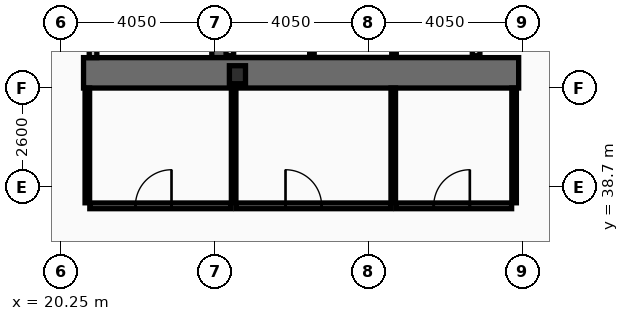
"""IFC4 building model, lengths in metres.
Left out: names, types, materials, properties, quantities, classifications, styles, units other than length and angle.
Written with IfcOpenShell. Run it as: python <this file> out.ifc"""

import sys

from ifc_helpers import new_model, si_unit, direction, frame, frame_2d, origin, origin_2d, place, context, subcontext, project, spatial, rectangle, i_section, extrude, element, fill, save


model = new_model("IFC4")
c1 = context("Model", 3, precision=1e-05, world=origin(), true_north=direction((0.0, 1.0)))
c2 = subcontext(c1, "Body", "Model", "MODEL_VIEW")
j1 = project(units=[si_unit("LENGTHUNIT", "METRE"), si_unit("PLANEANGLEUNIT", "RADIAN")], contexts=[c1])
p1 = place(None, origin())
s1 = spatial("IfcSite", under=j1, at=p1, CompositionType="ELEMENT")
p2 = place(p1, origin())
s2 = spatial("IfcBuilding", under=s1, at=p2, CompositionType="ELEMENT")
p3 = place(p2, frame((0.0, 0.0, 10.4)))
s3 = spatial("IfcBuildingStorey", under=s2, at=p3, CompositionType="ELEMENT", Elevation=10.4)
p4 = place(p3, frame((24.45, 42.1, 0.0), z_axis=(0.0, 0.0, 1.0), x_axis=(0.0, 1.0, 0.0)))
e1 = element("IfcWall", 1, at=p4, inside=s3, PredefinedType="SHEAR", context=c2, shape_type="SweptSolid", body=[
    extrude(rectangle(XDim=10.8, YDim=0.45, at=frame_2d((5.4, 0.0))), origin(), (0.0, 0.0, 1.0), 4.8),
])
p5 = place(p3, frame((32.3, 41.7, 0.0), z_axis=(0.0, 0.0, 1.0), x_axis=(-1.0, 0.0, 0.0)))
e2 = element("IfcWall", 2, at=p5, inside=s3, PredefinedType="SHEAR", context=c2, shape_type="SweptSolid", body=[
    extrude(rectangle(XDim=11.45, YDim=0.8, at=frame_2d((5.725, 0.0))), origin(), (0.0, 0.0, 1.0), 4.8),
])
p6 = place(p3, frame((24.9, 41.65, 0.0), z_axis=(0.0, 0.0, 1.0), x_axis=(1.0, 0.0, 0.0)))
e3 = element("IfcColumn", 3, at=p6, inside=s3, PredefinedType="COLUMN", context=c2, shape_type="SweptSolid", body=[
    extrude(i_section(OverallWidth=0.424, OverallDepth=0.474, WebThickness=0.048, FlangeThickness=0.077, at=origin_2d()), origin(), (0.0, 0.0, 1.0), 5.0),
])
p7 = place(p3, frame((21.1, 42.1, 0.0), z_axis=(0.0, 0.0, 1.0), x_axis=(0.0, 1.0, 0.0)))
e4 = element("IfcWall", 4, at=p7, inside=s3, PredefinedType="PARTITIONING", context=c2, shape_type="SweptSolid", body=[
    extrude(rectangle(XDim=2.395, YDim=0.2, at=frame_2d((1.198, 0.0))), origin(), (0.0, 0.0, 1.0), 4.8),
])
p8 = place(p7, frame((0.38, 0.0, 0.0)))
e5 = element("IfcOpeningElement", 5, at=p8, cuts=e4, PredefinedType="OPENING", context=c2, shape_type="SweptSolid", body=[
    extrude(rectangle(XDim=1.05, YDim=2.15, at=frame_2d((0.525, 1.075))), frame((0.0, 0.11, 0.0), z_axis=(0.0, -1.0, 0.0), x_axis=(1.0, 0.0, 0.0)), (0.0, 0.0, 1.0), 0.22),
])
for number, where, z_axis, x_axis in (
    (6, (24.7, 42.15, 0.0), (0.0, 0.0, 1.0), (0.0, 1.0, 0.0)),
    (7, (31.18, 42.15, 0.0), (0.0, 0.0, 1.0), (0.0, 1.0, 0.0)),
):
    element("IfcWall", number, at=place(p3, frame(where, z_axis=z_axis, x_axis=x_axis)), inside=s3, PredefinedType="PARTITIONING", context=c2, shape_type="SweptSolid", body=[
        extrude(rectangle(XDim=2.095, YDim=0.2, at=frame_2d((1.048, 0.0))), origin(), (0.0, 0.0, 1.0), 4.8),
    ])
for number, where, z_axis, x_axis in (
    (8, (26.86, 42.15, 0.0), (0.0, 0.0, 1.0), (0.0, 1.0, 0.0)),
    (9, (29.02, 42.15, 0.0), (0.0, 0.0, 1.0), (0.0, 1.0, 0.0)),
):
    element("IfcWall", number, at=place(p3, frame(where, z_axis=z_axis, x_axis=x_axis)), inside=s3, PredefinedType="PARTITIONING", context=c2, shape_type="SweptSolid", body=[
        extrude(rectangle(XDim=2.095, YDim=0.12, at=frame_2d((1.048, 0.0))), origin(), (0.0, 0.0, 1.0), 4.8),
    ])
p9 = place(p3, frame((21.015, 38.2, 0.0), z_axis=(0.0, 0.0, 1.0), x_axis=(1.0, 0.0, 0.0)))
e10 = element("IfcWall", 10, at=p9, inside=s3, PredefinedType="PARTITIONING", context=c2, shape_type="SweptSolid", body=[
    extrude(rectangle(XDim=3.72, YDim=0.15, at=frame_2d((1.86, 0.0))), origin(), (0.0, 0.0, 1.0), 3.89),
])
p10 = place(p9, frame((1.2, 0.0, 0.0)))
e11 = element("IfcOpeningElement", 11, at=p10, cuts=e10, PredefinedType="OPENING", context=c2, shape_type="SweptSolid", body=[
    extrude(rectangle(XDim=0.95, YDim=2.05, at=frame_2d((0.475, 1.025))), frame((0.0, 0.085, 0.0), z_axis=(0.0, -1.0, 0.0), x_axis=(1.0, 0.0, 0.0)), (0.0, 0.0, 1.0), 0.17),
])
p11 = place(p3, frame((24.865, 38.2, 0.0), z_axis=(0.0, 0.0, 1.0), x_axis=(1.0, 0.0, 0.0)))
e12 = element("IfcWall", 12, at=p11, inside=s3, PredefinedType="PARTITIONING", context=c2, shape_type="SweptSolid", body=[
    extrude(rectangle(XDim=4.07, YDim=0.15, at=frame_2d((2.035, 0.0))), origin(), (0.0, 0.0, 1.0), 3.89),
])
p12 = place(p11, frame((1.3, 0.0, 0.0)))
e13 = element("IfcOpeningElement", 13, at=p12, cuts=e12, PredefinedType="OPENING", context=c2, shape_type="SweptSolid", body=[
    extrude(rectangle(XDim=0.95, YDim=2.05, at=frame_2d((0.475, 1.025))), frame((0.0, 0.085, 0.0), z_axis=(0.0, -1.0, 0.0), x_axis=(1.0, 0.0, 0.0)), (0.0, 0.0, 1.0), 0.17),
])
p13 = place(p3, frame((29.065, 38.2, 0.0), z_axis=(0.0, 0.0, 1.0), x_axis=(1.0, 0.0, 0.0)))
e14 = element("IfcWall", 14, at=p13, inside=s3, PredefinedType="PARTITIONING", context=c2, shape_type="SweptSolid", body=[
    extrude(rectangle(XDim=3.05, YDim=0.15, at=frame_2d((1.525, 0.0))), origin(), (0.0, 0.0, 1.0), 3.89),
])
p14 = place(p13, frame((1.0, 0.0, 0.0)))
e15 = element("IfcOpeningElement", 15, at=p14, cuts=e14, PredefinedType="OPENING", context=c2, shape_type="SweptSolid", body=[
    extrude(rectangle(XDim=0.95, YDim=2.05, at=frame_2d((0.475, 1.025))), frame((0.0, 0.085, 0.0), z_axis=(0.0, -1.0, 0.0), x_axis=(1.0, 0.0, 0.0)), (0.0, 0.0, 1.0), 0.17),
])
p15 = place(p3, frame((20.95, 38.28, 0.0), z_axis=(0.0, 0.0, 1.0), x_axis=(0.0, 1.0, 0.0)))
e16 = element("IfcWall", 16, at=p15, inside=s3, PredefinedType="PARTITIONING", context=c2, shape_type="SweptSolid", body=[
    extrude(rectangle(XDim=3.02, YDim=0.12, at=frame_2d((1.51, 0.0))), origin(), (0.0, 0.0, 1.0), 4.8),
])
p16 = place(p3, frame((24.8, 38.28, 0.0), z_axis=(0.0, 0.0, 1.0), x_axis=(0.0, 1.0, 0.0)))
e17 = element("IfcWall", 17, at=p16, inside=s3, PredefinedType="PARTITIONING", context=c2, shape_type="SweptSolid", body=[
    extrude(rectangle(XDim=3.02, YDim=0.12, at=frame_2d((1.51, 0.0))), origin(), (0.0, 0.0, 1.0), 3.89),
])
for number, where, z_axis, x_axis in (
    (18, (29.0, 38.28, 0.0), (0.0, 0.0, 1.0), (0.0, 1.0, 0.0)),
    (19, (32.18, 38.28, 0.0), (0.0, 0.0, 1.0), (0.0, 1.0, 0.0)),
):
    element("IfcWall", number, at=place(p3, frame(where, z_axis=z_axis, x_axis=x_axis)), inside=s3, PredefinedType="PARTITIONING", context=c2, shape_type="SweptSolid", body=[
        extrude(rectangle(XDim=3.02, YDim=0.12, at=frame_2d((1.51, 0.0))), origin(), (0.0, 0.0, 1.0), 4.8),
    ])
p17 = place(p10, origin())
e20 = element("IfcDoor", 20, at=p17, inside=s3, OperationType="SINGLE_SWING_RIGHT", PredefinedType="DOOR", context=c2, shape_type="SweptSolid", body=[
    extrude(rectangle(XDim=0.95, YDim=2.05, at=frame_2d((0.475, 1.025))), frame((0.0, 0.025, 0.0), z_axis=(0.0, -1.0, 0.0), x_axis=(1.0, 0.0, 0.0)), (0.0, 0.0, 1.0), 0.05),
])
fill(e11, e20)
p18 = place(p12, origin())
e21 = element("IfcDoor", 21, at=p18, inside=s3, OperationType="SINGLE_SWING_LEFT", PredefinedType="DOOR", context=c2, shape_type="SweptSolid", body=[
    extrude(rectangle(XDim=0.95, YDim=2.05, at=frame_2d((0.475, 1.025))), frame((0.0, 0.025, 0.0), z_axis=(0.0, -1.0, 0.0), x_axis=(1.0, 0.0, 0.0)), (0.0, 0.0, 1.0), 0.05),
])
fill(e13, e21)
p19 = place(p14, origin())
e22 = element("IfcDoor", 22, at=p19, inside=s3, OperationType="SINGLE_SWING_RIGHT", PredefinedType="DOOR", context=c2, shape_type="SweptSolid", body=[
    extrude(rectangle(XDim=0.95, YDim=2.05, at=frame_2d((0.475, 1.025))), frame((0.0, 0.025, 0.0), z_axis=(0.0, -1.0, 0.0), x_axis=(1.0, 0.0, 0.0)), (0.0, 0.0, 1.0), 0.05),
])
fill(e15, e22)
save(model, sys.argv[1])
